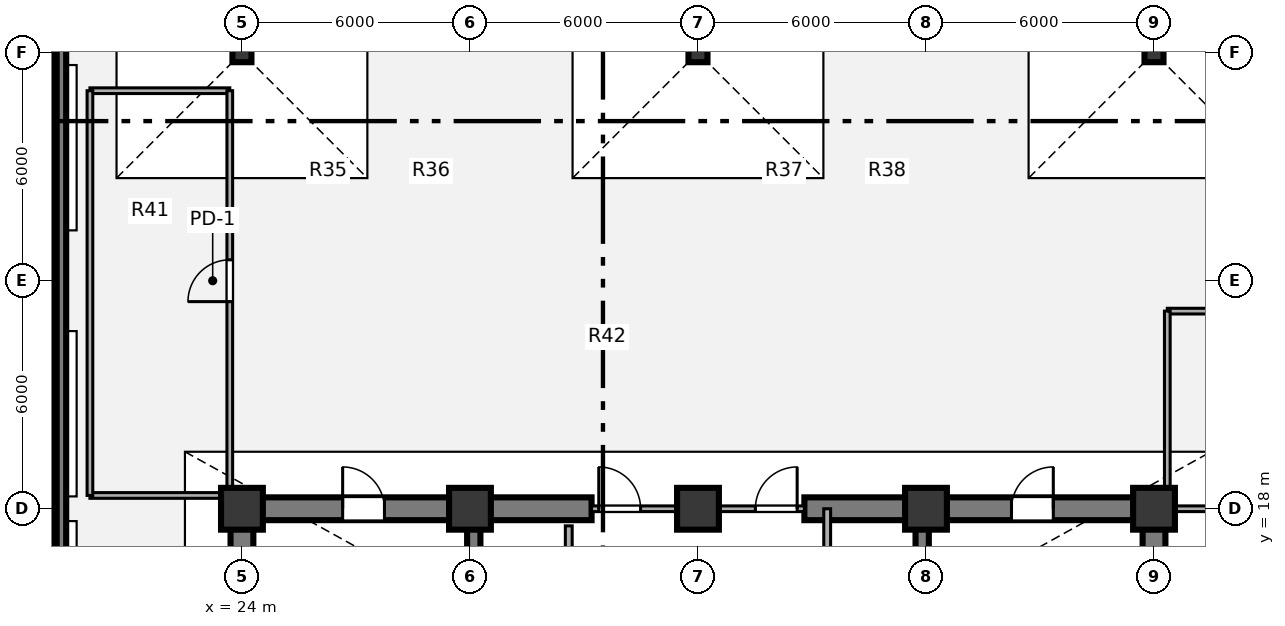
"""IFC4 building model, lengths in metres.
Left out: names, types, materials, properties, quantities, classifications, styles, units other than length and angle.
Written with IfcOpenShell. Run it as: python <this file> out.ifc"""

import sys

from ifc_helpers import new_model, si_unit, direction, frame, frame_2d, origin, origin_2d, place, context, subcontext, project, spatial, rectangle, i_section, extrude, source, transform, mapped, element, fill, save


model = new_model("IFC4")
c1 = context("Model", 3, precision=1e-05, world=origin(), true_north=direction((0.0, 1.0)))
c2 = subcontext(c1, "Body", "Model", "MODEL_VIEW")
j1 = project(units=[si_unit("LENGTHUNIT", "METRE"), si_unit("PLANEANGLEUNIT", "RADIAN")], contexts=[c1])
p1 = place(None, origin())
s1 = spatial("IfcSite", under=j1, at=p1, CompositionType="ELEMENT")
p2 = place(p1, origin())
s2 = spatial("IfcBuilding", under=s1, at=p2, CompositionType="ELEMENT")
p3 = place(p2, frame((0.0, 0.0, -4.86)))
s3 = spatial("IfcBuildingStorey", under=s2, at=p3, CompositionType="ELEMENT", Elevation=-4.86)
m1 = source(origin(), c2, "Body", "SweptSolid", [
    extrude(rectangle(XDim=1.1, YDim=1.1, at=origin_2d()), origin(), (0.0, 0.0, 1.0), 4.86),
])
for number, where, z_axis, x_axis in (
    (1, (24.0, 18.0, 0.0), (0.0, 0.0, 1.0), (1.0, 0.0, 0.0)),
    (2, (30.0, 18.0, 0.0), (0.0, 0.0, 1.0), (1.0, 0.0, 0.0)),
    (3, (36.0, 18.0, 0.0), (0.0, 0.0, 1.0), (1.0, 0.0, 0.0)),
    (4, (42.0, 18.0, 0.0), (0.0, 0.0, 1.0), (1.0, 0.0, 0.0)),
    (5, (48.0, 18.0, 0.0), (0.0, 0.0, 1.0), (1.0, 0.0, 0.0)),
):
    element("IfcColumn", number, at=place(p3, frame(where, z_axis=z_axis, x_axis=x_axis)), inside=s3, PredefinedType="COLUMN", context=c2, shape_type="MappedRepresentation", body=[
        mapped(m1, transform((0.0, 0.0, 0.0), x_axis=(1.0, 0.0, 0.0), y_axis=(0.0, 1.0, 0.0), z_axis=(0.0, 0.0, 1.0), scale=1.0)),
    ])
for number, where, z_axis, x_axis in (
    (6, (24.0, 6.0, 0.0), (0.0, 0.0, 1.0), (0.0, 1.0, 0.0)),
    (7, (48.0, 18.0, 0.0), (0.0, 0.0, 1.0), (0.0, -1.0, 0.0)),
):
    element("IfcWall", number, at=place(p3, frame(where, z_axis=z_axis, x_axis=x_axis)), inside=s3, PredefinedType="SHEAR", context=c2, shape_type="SweptSolid", body=[
        extrude(rectangle(XDim=12.0, YDim=0.6, at=frame_2d((6.0, 0.0))), origin(), (0.0, 0.0, 1.0), 4.86),
    ])
p4 = place(p3, frame((23.7, 18.0, 0.0), z_axis=(0.0, 0.0, 1.0), x_axis=(1.0, 0.0, 0.0)))
e8 = element("IfcWall", 8, at=p4, inside=s3, PredefinedType="SHEAR", context=c2, shape_type="SweptSolid", body=[
    extrude(rectangle(XDim=9.5, YDim=0.6, at=frame_2d((4.75, 0.0))), origin(), (0.0, 0.0, 1.0), 4.86),
])
p5 = place(p4, frame((2.95, 0.0, 0.0)))
e9 = element("IfcOpeningElement", 9, at=p5, cuts=e8, PredefinedType="OPENING", context=c2, shape_type="SweptSolid", body=[
    extrude(rectangle(XDim=1.1, YDim=2.1, at=origin_2d()), frame((0.55, 0.31, 1.05), z_axis=(0.0, -1.0, 0.0), x_axis=(1.0, 0.0, 0.0)), (0.0, 0.0, 1.0), 0.62),
])
p6 = place(p3, frame((38.8, 18.0, 0.0), z_axis=(0.0, 0.0, 1.0), x_axis=(1.0, 0.0, 0.0)))
e10 = element("IfcWall", 10, at=p6, inside=s3, PredefinedType="SHEAR", context=c2, shape_type="SweptSolid", body=[
    extrude(rectangle(XDim=9.5, YDim=0.6, at=frame_2d((4.75, 0.0))), origin(), (0.0, 0.0, 1.0), 4.86),
])
p7 = place(p6, frame((5.45, 0.0, 0.0)))
e11 = element("IfcOpeningElement", 11, at=p7, cuts=e10, PredefinedType="OPENING", context=c2, shape_type="SweptSolid", body=[
    extrude(rectangle(XDim=1.1, YDim=2.1, at=origin_2d()), frame((0.55, 0.31, 1.05), z_axis=(0.0, -1.0, 0.0), x_axis=(1.0, 0.0, 0.0)), (0.0, 0.0, 1.0), 0.62),
])
p8 = place(p3, frame((30.1, 6.0, 0.0), z_axis=(0.0, 0.0, 1.0), x_axis=(0.0, 1.0, 0.0)))
e12 = element("IfcWall", 12, at=p8, inside=s3, PredefinedType="SHEAR", context=c2, shape_type="SweptSolid", body=[
    extrude(rectangle(XDim=12.0, YDim=0.35, at=frame_2d((6.0, 0.0))), origin(), (0.0, 0.0, 1.0), 4.86),
])
p9 = place(p3, frame((41.9, 18.0, 0.0), z_axis=(0.0, 0.0, 1.0), x_axis=(0.0, -1.0, 0.0)))
e13 = element("IfcWall", 13, at=p9, inside=s3, PredefinedType="SHEAR", context=c2, shape_type="SweptSolid", body=[
    extrude(rectangle(XDim=12.0, YDim=0.35, at=frame_2d((6.0, 0.0))), origin(), (0.0, 0.0, 1.0), 4.86),
])
p10 = place(p9, frame((10.08, 0.0, 0.0)))
e14 = element("IfcOpeningElement", 14, at=p10, cuts=e13, PredefinedType="OPENING", context=c2, shape_type="SweptSolid", body=[
    extrude(rectangle(XDim=1.3, YDim=2.1, at=origin_2d()), frame((0.65, 0.185, 1.05), z_axis=(0.0, -1.0, 0.0), x_axis=(1.0, 0.0, 0.0)), (0.0, 0.0, 1.0), 0.37),
])
p11 = place(p3, frame((19.25, 5.64, 0.0), z_axis=(0.0, 0.0, 1.0), x_axis=(0.0, 1.0, 0.0)))
e15 = element("IfcWall", 15, at=p11, inside=s3, PredefinedType="SHEAR", context=c2, shape_type="SweptSolid", body=[
    extrude(rectangle(XDim=28.21, YDim=0.25, at=frame_2d((14.105, 0.0))), origin(), (0.0, 0.0, 1.0), 4.86),
])
m2 = source(origin(), c2, "Body", "SweptSolid", [
    extrude(i_section(OverallWidth=0.5, OverallDepth=0.5, WebThickness=0.028, FlangeThickness=0.045, at=origin_2d()), origin(), (0.0, 0.0, 1.0), 4.86),
])
for number, where, z_axis, x_axis in (
    (16, (24.0, 30.0, 0.0), (0.0, 0.0, 1.0), (1.0, 0.0, 0.0)),
    (17, (36.0, 30.0, 0.0), (0.0, 0.0, 1.0), (1.0, 0.0, 0.0)),
    (18, (48.0, 30.0, 0.0), (0.0, 0.0, 1.0), (1.0, 0.0, 0.0)),
):
    element("IfcColumn", number, at=place(p3, frame(where, z_axis=z_axis, x_axis=x_axis)), inside=s3, PredefinedType="COLUMN", context=c2, shape_type="MappedRepresentation", body=[
        mapped(m2, transform((0.0, 0.0, 0.0), x_axis=(1.0, 0.0, 0.0), y_axis=(0.0, 1.0, 0.0), z_axis=(0.0, 0.0, 1.0), scale=1.0)),
    ])
p12 = place(p3, frame((32.6, 11.0, 0.0), z_axis=(0.0, 0.0, 1.0), x_axis=(0.0, 1.0, 0.0)))
e19 = element("IfcWall", 19, at=p12, inside=s3, PredefinedType="PARTITIONING", context=c2, shape_type="SweptSolid", body=[
    extrude(rectangle(XDim=6.55, YDim=0.18, at=frame_2d((3.275, 0.0))), origin(), (0.0, 0.0, 1.0), 4.51),
])
p13 = place(p12, frame((2.4, 0.0, 0.0)))
e20 = element("IfcOpeningElement", 20, at=p13, cuts=e19, PredefinedType="OPENING", context=c2, shape_type="SweptSolid", body=[
    extrude(rectangle(XDim=1.1, YDim=2.1, at=origin_2d()), frame((0.55, 0.1, 1.05), z_axis=(0.0, -1.0, 0.0), x_axis=(1.0, 0.0, 0.0)), (0.0, 0.0, 1.0), 0.2),
])
p14 = place(p3, frame((39.4, 11.0, 0.0), z_axis=(0.0, 0.0, 1.0), x_axis=(0.0, 1.0, 0.0)))
e21 = element("IfcWall", 21, at=p14, inside=s3, PredefinedType="PARTITIONING", context=c2, shape_type="SweptSolid", body=[
    extrude(rectangle(XDim=7.0, YDim=0.18, at=frame_2d((3.5, 0.0))), origin(), (0.0, 0.0, 1.0), 4.51),
])
p15 = place(p14, frame((2.4, 0.0, 0.0)))
e22 = element("IfcOpeningElement", 22, at=p15, cuts=e21, PredefinedType="OPENING", context=c2, shape_type="SweptSolid", body=[
    extrude(rectangle(XDim=1.1, YDim=2.1, at=origin_2d()), frame((0.55, 0.1, 1.05), z_axis=(0.0, -1.0, 0.0), x_axis=(1.0, 0.0, 0.0)), (0.0, 0.0, 1.0), 0.2),
])
p16 = place(p3, frame((33.2, 18.0, 0.0), z_axis=(0.0, 0.0, 1.0), x_axis=(1.0, 0.0, 0.0)))
e23 = element("IfcWall", 23, at=p16, inside=s3, PredefinedType="PARTITIONING", context=c2, shape_type="SweptSolid", body=[
    extrude(rectangle(XDim=5.6, YDim=0.15, at=frame_2d((2.8, 0.0))), origin(), (0.0, 0.0, 1.0), 3.325),
])
p17 = place(p16, frame((0.19, 0.0, 0.0)))
e24 = element("IfcOpeningElement", 24, at=p17, cuts=e23, PredefinedType="OPENING", context=c2, shape_type="SweptSolid", body=[
    extrude(rectangle(XDim=1.1, YDim=2.1, at=origin_2d()), frame((0.55, 0.085, 1.05), z_axis=(0.0, -1.0, 0.0), x_axis=(1.0, 0.0, 0.0)), (0.0, 0.0, 1.0), 0.17),
])
p18 = place(p16, frame((4.31, 0.0, 0.0)))
e25 = element("IfcOpeningElement", 25, at=p18, cuts=e23, PredefinedType="OPENING", context=c2, shape_type="SweptSolid", body=[
    extrude(rectangle(XDim=1.1, YDim=2.1, at=origin_2d()), frame((0.55, 0.085, 1.05), z_axis=(0.0, -1.0, 0.0), x_axis=(1.0, 0.0, 0.0)), (0.0, 0.0, 1.0), 0.17),
])
p19 = place(p3, frame((48.35, 18.0, 0.0), z_axis=(0.0, 0.0, 1.0), x_axis=(1.0, 0.0, 0.0)))
e26 = element("IfcWall", 26, at=p19, inside=s3, PredefinedType="PARTITIONING", context=c2, shape_type="SweptSolid", body=[
    extrude(rectangle(XDim=7.85, YDim=0.15, at=frame_2d((3.925, 0.0))), origin(), (0.0, 0.0, 1.0), 3.625),
])
p20 = place(p19, frame((3.35, 0.0, 0.0)))
e27 = element("IfcOpeningElement", 27, at=p20, cuts=e26, PredefinedType="OPENING", context=c2, shape_type="SweptSolid", body=[
    extrude(rectangle(XDim=1.1, YDim=2.1, at=origin_2d()), frame((0.55, 0.085, 1.05), z_axis=(0.0, -1.0, 0.0), x_axis=(1.0, 0.0, 0.0)), (0.0, 0.0, 1.0), 0.17),
])
p21 = place(p3, frame((20.0, 18.35, 0.0), z_axis=(0.0, 0.0, 1.0), x_axis=(1.0, 0.0, 0.0)))
e28 = element("IfcWall", 28, at=p21, inside=s3, PredefinedType="PARTITIONING", context=c2, shape_type="SweptSolid", body=[
    extrude(rectangle(XDim=3.68, YDim=0.15, at=frame_2d((1.84, 0.0))), origin(), (0.0, 0.0, 1.0), 4.51),
])
p22 = place(p3, frame((48.35, 23.2, 0.0), z_axis=(0.0, 0.0, 1.0), x_axis=(1.0, 0.0, 0.0)))
e29 = element("IfcWall", 29, at=p22, inside=s3, PredefinedType="PARTITIONING", context=c2, shape_type="SweptSolid", body=[
    extrude(rectangle(XDim=7.85, YDim=0.15, at=frame_2d((3.925, 0.0))), origin(), (0.0, 0.0, 1.0), 4.51),
])
p23 = place(p22, frame((3.8, 0.0, 0.0)))
e30 = element("IfcOpeningElement", 30, at=p23, cuts=e29, PredefinedType="OPENING", context=c2, shape_type="SweptSolid", body=[
    extrude(rectangle(XDim=1.1, YDim=2.1, at=origin_2d()), frame((0.55, 0.085, 1.05), z_axis=(0.0, -1.0, 0.0), x_axis=(1.0, 0.0, 0.0)), (0.0, 0.0, 1.0), 0.17),
])
p24 = place(p3, frame((20.0, 29.0, 0.0), z_axis=(0.0, 0.0, 1.0), x_axis=(1.0, 0.0, 0.0)))
e31 = element("IfcWall", 31, at=p24, inside=s3, PredefinedType="PARTITIONING", context=c2, shape_type="SweptSolid", body=[
    extrude(rectangle(XDim=3.68, YDim=0.15, at=frame_2d((1.84, 0.0))), origin(), (0.0, 0.0, 1.0), 4.51),
])
p25 = place(p3, frame((20.0, 18.35, 0.0), z_axis=(0.0, 0.0, 1.0), x_axis=(0.0, 1.0, 0.0)))
e32 = element("IfcWall", 32, at=p25, inside=s3, PredefinedType="PARTITIONING", context=c2, shape_type="SweptSolid", body=[
    extrude(rectangle(XDim=10.65, YDim=0.15, at=frame_2d((5.325, 0.0))), origin(), (0.0, 0.0, 1.0), 3.725),
])
p26 = place(p3, frame((23.68, 18.35, 0.0), z_axis=(0.0, 0.0, 1.0), x_axis=(0.0, 1.0, 0.0)))
e33 = element("IfcWall", 33, at=p26, inside=s3, PredefinedType="PARTITIONING", context=c2, shape_type="SweptSolid", body=[
    extrude(rectangle(XDim=10.65, YDim=0.15, at=frame_2d((5.325, 0.0))), origin(), (0.0, 0.0, 1.0), 4.51),
])
p27 = place(p26, frame((5.1, 0.0, 0.0)))
e34 = element("IfcOpeningElement", 34, at=p27, cuts=e33, PredefinedType="OPENING", context=c2, shape_type="SweptSolid", body=[
    extrude(rectangle(XDim=1.1, YDim=2.1, at=origin_2d()), frame((0.55, 0.085, 1.05), z_axis=(0.0, -1.0, 0.0), x_axis=(1.0, 0.0, 0.0)), (0.0, 0.0, 1.0), 0.17),
])
p28 = place(p3, frame((48.35, 18.0, 0.0), z_axis=(0.0, 0.0, 1.0), x_axis=(0.0, 1.0, 0.0)))
e35 = element("IfcWall", 35, at=p28, inside=s3, PredefinedType="PARTITIONING", context=c2, shape_type="SweptSolid", body=[
    extrude(rectangle(XDim=5.2, YDim=0.15, at=frame_2d((2.6, 0.0))), origin(), (0.0, 0.0, 1.0), 4.51),
])
m3 = source(origin(), c2, "Body", "SweptSolid", [
    extrude(rectangle(XDim=1.1, YDim=2.1, at=origin_2d()), frame((0.55, 0.025, 1.05), z_axis=(0.0, -1.0, 0.0), x_axis=(1.0, 0.0, 0.0)), (0.0, 0.0, 1.0), 0.05),
])
p29 = place(p17, origin())
e36 = element("IfcDoor", 36, at=p29, inside=s3, OperationType="SINGLE_SWING_LEFT", PredefinedType="DOOR", context=c2, shape_type="MappedRepresentation", body=[
    mapped(m3, transform((0.0, 0.0, 0.0), x_axis=(1.0, 0.0, 0.0), y_axis=(0.0, 1.0, 0.0), z_axis=(0.0, 0.0, 1.0), scale=1.0)),
])
fill(e24, e36)
p30 = place(p18, origin())
e37 = element("IfcDoor", 37, at=p30, inside=s3, OperationType="SINGLE_SWING_RIGHT", PredefinedType="DOOR", context=c2, shape_type="MappedRepresentation", body=[
    mapped(m3, transform((0.0, 0.0, 0.0), x_axis=(1.0, 0.0, 0.0), y_axis=(0.0, 1.0, 0.0), z_axis=(0.0, 0.0, 1.0), scale=1.0)),
])
fill(e25, e37)
p31 = place(p5, origin())
e38 = element("IfcDoor", 38, at=p31, inside=s3, OperationType="SINGLE_SWING_LEFT", PredefinedType="DOOR", context=c2, shape_type="MappedRepresentation", body=[
    mapped(m3, transform((0.0, 0.0, 0.0), x_axis=(1.0, 0.0, 0.0), y_axis=(0.0, 1.0, 0.0), z_axis=(0.0, 0.0, 1.0), scale=1.0)),
])
fill(e9, e38)
p32 = place(p7, origin())
e39 = element("IfcDoor", 39, at=p32, inside=s3, OperationType="SINGLE_SWING_RIGHT", PredefinedType="DOOR", context=c2, shape_type="MappedRepresentation", body=[
    mapped(m3, transform((0.0, 0.0, 0.0), x_axis=(1.0, 0.0, 0.0), y_axis=(0.0, 1.0, 0.0), z_axis=(0.0, 0.0, 1.0), scale=1.0)),
])
fill(e11, e39)
m4 = source(origin(), c2, "Body", "SweptSolid", [
    extrude(rectangle(XDim=1.1, YDim=2.1, at=origin_2d()), frame((0.55, 0.025, 1.05), z_axis=(0.0, -1.0, 0.0), x_axis=(1.0, 0.0, 0.0)), (0.0, 0.0, 1.0), 0.05),
])
p33 = place(p27, origin())
e40 = element("IfcDoor", 40, at=p33, inside=s3, OperationType="SINGLE_SWING_LEFT", PredefinedType="DOOR", context=c2, shape_type="MappedRepresentation", body=[
    mapped(m4, transform((0.0, 0.0, 0.0), x_axis=(1.0, 0.0, 0.0), y_axis=(0.0, 1.0, 0.0), z_axis=(0.0, 0.0, 1.0), scale=1.0)),
])
fill(e34, e40)
save(model, sys.argv[1])
